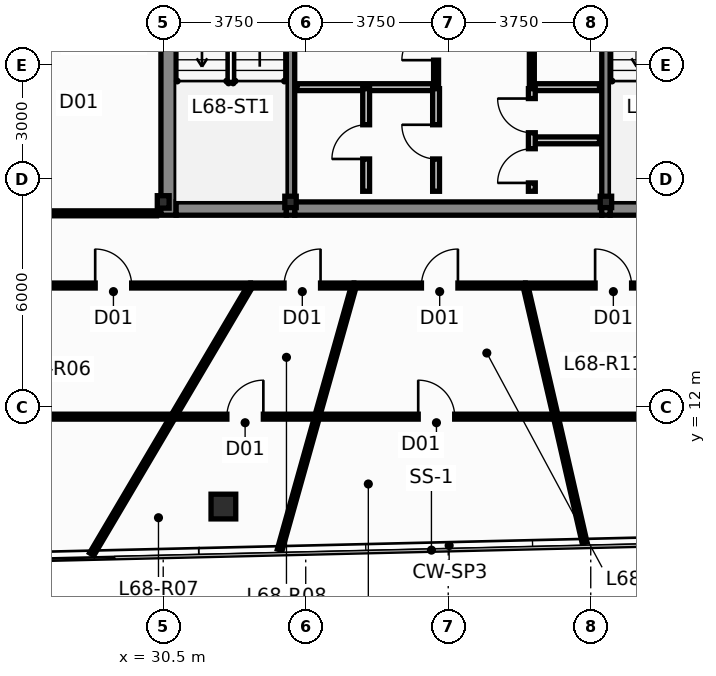
"""IFC4 building model, lengths in metres.
Left out: names, types, materials, properties, quantities, classifications, styles, units other than length and angle.
Written with IfcOpenShell. Run it as: python <this file> out.ifc"""

import sys

from ifc_helpers import new_model, si_unit, direction, frame, frame_2d, origin, origin_2d, place, context, subcontext, project, spatial, rectangle, hollow_rectangle, i_section, extrude, source, transform, mapped, element, fill, save


model = new_model("IFC4")
c1 = context("Model", 3, precision=1e-05, world=origin(), true_north=direction((0.0, 1.0)))
c2 = subcontext(c1, "Body", "Model", "MODEL_VIEW")
j1 = project(units=[si_unit("LENGTHUNIT", "METRE"), si_unit("PLANEANGLEUNIT", "RADIAN")], contexts=[c1])
p1 = place(None, origin())
s1 = spatial("IfcSite", under=j1, at=p1, CompositionType="ELEMENT")
p2 = place(p1, origin())
s2 = spatial("IfcBuilding", under=s1, at=p2, CompositionType="ELEMENT")
p3 = place(p2, frame((0.0, 0.0, 259.05)))
s3 = spatial("IfcBuildingStorey", under=s2, at=p3, CompositionType="ELEMENT", Elevation=259.05)
m1 = source(origin(), c2, "Body", "SweptSolid", [
    extrude(i_section(OverallWidth=0.311, OverallDepth=0.327, WebThickness=0.016, FlangeThickness=0.025, at=origin_2d()), origin(), (0.0, 0.0, 1.0), 3.65),
])
p4 = place(p3, frame((30.5, 17.4, 0.0), z_axis=(0.0, 0.0, 1.0), x_axis=(1.0, 0.0, 0.0)))
e1 = element("IfcColumn", 1, at=p4, inside=s3, PredefinedType="COLUMN", context=c2, shape_type="MappedRepresentation", body=[
    mapped(m1, transform((0.0, 0.0, 0.0), scale=1.0)),
])
m2 = source(origin(), c2, "Body", "SweptSolid", [
    extrude(hollow_rectangle(XDim=0.3, YDim=0.3, WallThickness=0.012, at=origin_2d()), origin(), (0.0, 0.0, 1.0), 3.65),
])
for number, where, z_axis, x_axis in (
    (2, (33.85, 17.4, 0.0), (0.0, 0.0, 1.0), (1.0, 0.0, 0.0)),
    (3, (42.15, 17.4, 0.0), (0.0, 0.0, 1.0), (1.0, 0.0, 0.0)),
):
    element("IfcColumn", number, at=place(p3, frame(where, z_axis=z_axis, x_axis=x_axis)), inside=s3, PredefinedType="COLUMN", context=c2, shape_type="MappedRepresentation", body=[
        mapped(m2, transform((0.0, 0.0, 0.0), scale=1.0)),
    ])
p5 = place(p3, frame((30.64, 17.05, 0.0), z_axis=(0.0, 0.0, 1.0), x_axis=(0.0, 1.0, 0.0)))
e4 = element("IfcWall", 4, at=p5, inside=s3, PredefinedType="SHEAR", context=c2, shape_type="SweptSolid", body=[
    extrude(rectangle(XDim=13.125, YDim=0.4, at=frame_2d((6.562, 0.0))), origin(), (0.0, 0.0, 1.0), 3.65),
])
p6 = place(p5, frame((6.3, 0.0, 0.0)))
e5 = element("IfcOpeningElement", 5, at=p6, cuts=e4, PredefinedType="OPENING", context=c2, shape_type="SweptSolid", body=[
    extrude(rectangle(XDim=1.12, YDim=2.15, at=frame_2d((0.56, 1.075))), frame((0.0, 0.212, 0.0), z_axis=(0.0, -1.0, 0.0), x_axis=(1.0, 0.0, 0.0)), (0.0, 0.0, 1.0), 0.424),
])
p7 = place(p5, frame((10.75, 0.0, 0.0)))
e6 = element("IfcOpeningElement", 6, at=p7, cuts=e4, PredefinedType="OPENING", context=c2, shape_type="SweptSolid", body=[
    extrude(rectangle(XDim=1.2, YDim=2.2, at=frame_2d((0.6, 1.1))), frame((0.0, 0.212, 0.0), z_axis=(0.0, -1.0, 0.0), x_axis=(1.0, 0.0, 0.0)), (0.0, 0.0, 1.0), 0.424),
])
p8 = place(p3, frame((30.84, 17.225, 0.0), z_axis=(0.0, 0.0, 1.0), x_axis=(1.0, 0.0, 0.0)))
e7 = element("IfcWall", 7, at=p8, inside=s3, PredefinedType="SHEAR", context=c2, shape_type="SweptSolid", body=[
    extrude(rectangle(XDim=2.9, YDim=0.35, at=frame_2d((1.45, 0.0))), origin(), (0.0, 0.0, 1.0), 3.65),
])
p9 = place(p3, frame((33.96, 17.225, 0.0), z_axis=(0.0, 0.0, 1.0), x_axis=(1.0, 0.0, 0.0)))
e8 = element("IfcWall", 8, at=p9, inside=s3, PredefinedType="SHEAR", context=c2, shape_type="SweptSolid", body=[
    extrude(rectangle(XDim=8.08, YDim=0.35, at=frame_2d((4.04, 0.0))), origin(), (0.0, 0.0, 1.0), 3.65),
])
p10 = place(p3, frame((42.26, 17.225, 0.0), z_axis=(0.0, 0.0, 1.0), x_axis=(1.0, 0.0, 0.0)))
e9 = element("IfcWall", 9, at=p10, inside=s3, PredefinedType="SHEAR", context=c2, shape_type="SweptSolid", body=[
    extrude(rectangle(XDim=2.9, YDim=0.35, at=frame_2d((1.45, 0.0))), origin(), (0.0, 0.0, 1.0), 3.65),
])
for number, where, z_axis, x_axis in (
    (10, (33.85, 17.05, 0.0), (0.0, 0.0, 1.0), (0.0, 1.0, 0.0)),
    (11, (42.15, 17.05, 0.0), (0.0, 0.0, 1.0), (0.0, 1.0, 0.0)),
):
    element("IfcWall", number, at=place(p3, frame(where, z_axis=z_axis, x_axis=x_axis)), inside=s3, PredefinedType="SHEAR", context=c2, shape_type="SweptSolid", body=[
        extrude(rectangle(XDim=13.125, YDim=0.22, at=frame_2d((6.562, 0.0))), origin(), (0.0, 0.0, 1.0), 3.65),
    ])
m3 = source(origin(), c2, "Body", "SweptSolid", [
    extrude(hollow_rectangle(XDim=0.65, YDim=0.65, WallThickness=0.04, at=origin_2d()), origin(), (0.0, 0.0, 1.0), 3.651),
])
p11 = place(p3, frame((32.083, 9.385, 0.0), z_axis=(-0.004480682206, 0.019795252729, 0.999794014513), x_axis=(-0.975326687046, -0.220766513622, 0.0)))
e12 = element("IfcColumn", 12, at=p11, inside=s3, PredefinedType="COLUMN", context=c2, shape_type="MappedRepresentation", body=[
    mapped(m3, transform((0.0, 0.0, 0.0), scale=1.0)),
])
p12 = place(p3, frame((34.02, 20.42, 0.0), z_axis=(0.0, 0.0, 1.0), x_axis=(1.0, 0.0, 0.0)))
e13 = element("IfcWall", 13, at=p12, inside=s3, PredefinedType="PARTITIONING", context=c2, shape_type="SweptSolid", body=[
    extrude(rectangle(XDim=3.64, YDim=0.18, at=frame_2d((1.82, 0.0))), origin(), (0.0, 0.0, 1.0), 3.4),
])
p13 = place(p3, frame((40.22, 20.42, 0.0), z_axis=(0.0, 0.0, 1.0), x_axis=(1.0, 0.0, 0.0)))
e14 = element("IfcWall", 14, at=p13, inside=s3, PredefinedType="PARTITIONING", context=c2, shape_type="SweptSolid", body=[
    extrude(rectangle(XDim=1.76, YDim=0.18, at=frame_2d((0.88, 0.0))), origin(), (0.0, 0.0, 1.0), 3.4),
])
p14 = place(p3, frame((37.68, 20.48, 0.0), z_axis=(0.0, 0.0, 1.0), x_axis=(0.0, 1.0, 0.0)))
e15 = element("IfcWall", 15, at=p14, inside=s3, PredefinedType="PARTITIONING", context=c2, shape_type="SweptSolid", body=[
    extrude(rectangle(XDim=6.9, YDim=0.13, at=frame_2d((3.45, 0.0))), origin(), (0.0, 0.0, 1.0), 3.4),
])
p15 = place(p14, frame((0.65, 0.0, 0.0)))
e16 = element("IfcOpeningElement", 16, at=p15, cuts=e15, PredefinedType="OPENING", context=c2, shape_type="SweptSolid", body=[
    extrude(rectangle(XDim=0.9, YDim=2.1, at=frame_2d((0.45, 1.05))), frame((0.0, 0.077, 0.0), z_axis=(0.0, -1.0, 0.0), x_axis=(1.0, 0.0, 0.0)), (0.0, 0.0, 1.0), 0.154),
])
p16 = place(p14, frame((2.95, 0.0, 0.0)))
e17 = element("IfcOpeningElement", 17, at=p16, cuts=e15, PredefinedType="OPENING", context=c2, shape_type="SweptSolid", body=[
    extrude(rectangle(XDim=0.9, YDim=2.1, at=frame_2d((0.45, 1.05))), frame((0.0, 0.077, 0.0), z_axis=(0.0, -1.0, 0.0), x_axis=(1.0, 0.0, 0.0)), (0.0, 0.0, 1.0), 0.154),
])
p17 = place(p14, frame((5.25, 0.0, 0.0)))
e18 = element("IfcOpeningElement", 18, at=p17, cuts=e15, PredefinedType="OPENING", context=c2, shape_type="SweptSolid", body=[
    extrude(rectangle(XDim=0.9, YDim=2.1, at=frame_2d((0.45, 1.05))), frame((0.0, 0.077, 0.0), z_axis=(0.0, -1.0, 0.0), x_axis=(1.0, 0.0, 0.0)), (0.0, 0.0, 1.0), 0.154),
])
p18 = place(p3, frame((40.2, 20.48, 0.0), z_axis=(0.0, 0.0, 1.0), x_axis=(0.0, 1.0, 0.0)))
e19 = element("IfcWall", 19, at=p18, inside=s3, PredefinedType="PARTITIONING", context=c2, shape_type="SweptSolid", body=[
    extrude(rectangle(XDim=6.9, YDim=0.13, at=frame_2d((3.45, 0.0))), origin(), (0.0, 0.0, 1.0), 3.4),
])
p19 = place(p18, frame((2.6, 0.0, 0.0)))
e20 = element("IfcOpeningElement", 20, at=p19, cuts=e19, PredefinedType="OPENING", context=c2, shape_type="SweptSolid", body=[
    extrude(rectangle(XDim=0.9, YDim=2.1, at=frame_2d((0.45, 1.05))), frame((0.0, 0.077, 0.0), z_axis=(0.0, -1.0, 0.0), x_axis=(1.0, 0.0, 0.0)), (0.0, 0.0, 1.0), 0.154),
])
p20 = place(p3, frame((35.84, 17.68, 0.0), z_axis=(0.0, 0.0, 1.0), x_axis=(0.0, 1.0, 0.0)))
e21 = element("IfcWall", 21, at=p20, inside=s3, PredefinedType="PARTITIONING", context=c2, shape_type="SweptSolid", body=[
    extrude(rectangle(XDim=2.7, YDim=0.18, at=frame_2d((1.35, 0.0))), origin(), (0.0, 0.0, 1.0), 3.4),
])
p21 = place(p20, frame((0.85, 0.0, 0.0)))
e22 = element("IfcOpeningElement", 22, at=p21, cuts=e21, PredefinedType="OPENING", context=c2, shape_type="SweptSolid", body=[
    extrude(rectangle(XDim=0.9, YDim=2.1, at=frame_2d((0.45, 1.05))), frame((0.0, 0.102, 0.0), z_axis=(0.0, -1.0, 0.0), x_axis=(1.0, 0.0, 0.0)), (0.0, 0.0, 1.0), 0.204),
])
p22 = place(p3, frame((37.68, 17.68, 0.0), z_axis=(0.0, 0.0, 1.0), x_axis=(0.0, 1.0, 0.0)))
e23 = element("IfcWall", 23, at=p22, inside=s3, PredefinedType="PARTITIONING", context=c2, shape_type="SweptSolid", body=[
    extrude(rectangle(XDim=2.7, YDim=0.18, at=frame_2d((1.35, 0.0))), origin(), (0.0, 0.0, 1.0), 3.4),
])
p23 = place(p22, frame((0.85, 0.0, 0.0)))
e24 = element("IfcOpeningElement", 24, at=p23, cuts=e23, PredefinedType="OPENING", context=c2, shape_type="SweptSolid", body=[
    extrude(rectangle(XDim=0.9, YDim=2.1, at=frame_2d((0.45, 1.05))), frame((0.0, 0.102, 0.0), z_axis=(0.0, -1.0, 0.0), x_axis=(1.0, 0.0, 0.0)), (0.0, 0.0, 1.0), 0.204),
])
p24 = place(p3, frame((40.28, 19.02, 0.0), z_axis=(0.0, 0.0, 1.0), x_axis=(1.0, 0.0, 0.0)))
e25 = element("IfcWall", 25, at=p24, inside=s3, PredefinedType="PARTITIONING", context=c2, shape_type="SweptSolid", body=[
    extrude(rectangle(XDim=1.7, YDim=0.18, at=frame_2d((0.85, 0.0))), origin(), (0.0, 0.0, 1.0), 3.4),
])
p25 = place(p3, frame((40.2, 17.68, 0.0), z_axis=(0.0, 0.0, 1.0), x_axis=(0.0, 1.0, 0.0)))
e26 = element("IfcWall", 26, at=p25, inside=s3, PredefinedType="PARTITIONING", context=c2, shape_type="SweptSolid", body=[
    extrude(rectangle(XDim=2.7, YDim=0.18, at=frame_2d((1.35, 0.0))), origin(), (0.0, 0.0, 1.0), 3.4),
])
p26 = place(p25, frame((0.22, 0.0, 0.0)))
e27 = element("IfcOpeningElement", 27, at=p26, cuts=e26, PredefinedType="OPENING", context=c2, shape_type="SweptSolid", body=[
    extrude(rectangle(XDim=0.9, YDim=2.1, at=frame_2d((0.45, 1.05))), frame((0.0, 0.102, 0.0), z_axis=(0.0, -1.0, 0.0), x_axis=(1.0, 0.0, 0.0)), (0.0, 0.0, 1.0), 0.204),
])
p27 = place(p25, frame((1.54, 0.0, 0.0)))
e28 = element("IfcOpeningElement", 28, at=p27, cuts=e26, PredefinedType="OPENING", context=c2, shape_type="SweptSolid", body=[
    extrude(rectangle(XDim=0.9, YDim=2.1, at=frame_2d((0.45, 1.05))), frame((0.0, 0.102, 0.0), z_axis=(0.0, -1.0, 0.0), x_axis=(1.0, 0.0, 0.0)), (0.0, 0.0, 1.0), 0.204),
])
p28 = place(p3, frame((20.705, 11.75, 0.0), z_axis=(0.0, 0.0, 1.0), x_axis=(1.0, 0.0, 0.0)))
e29 = element("IfcWall", 29, at=p28, inside=s3, PredefinedType="PARTITIONING", context=c2, shape_type="SweptSolid", body=[
    extrude(rectangle(XDim=10.05, YDim=0.13, at=frame_2d((5.025, 0.0))), origin(), (0.0, 0.0, 1.0), 3.129),
])
p29 = place(p28, frame((4.545, 0.0, 0.0)))
e30 = element("IfcOpeningElement", 30, at=p29, cuts=e29, PredefinedType="OPENING", context=c2, shape_type="SweptSolid", body=[
    extrude(rectangle(XDim=0.96, YDim=2.15, at=frame_2d((0.48, 1.075))), frame((0.0, 0.077, 0.0), z_axis=(0.0, -1.0, 0.0), x_axis=(1.0, 0.0, 0.0)), (0.0, 0.0, 1.0), 0.154),
])
p30 = place(p3, frame((25.585, 15.2, 0.0), z_axis=(0.0, 0.0, 1.0), x_axis=(1.0, 0.0, 0.0)))
e31 = element("IfcWall", 31, at=p30, inside=s3, PredefinedType="PARTITIONING", context=c2, shape_type="SweptSolid", body=[
    extrude(rectangle(XDim=7.21, YDim=0.13, at=frame_2d((3.605, 0.0))), origin(), (0.0, 0.0, 1.0), 3.129),
])
p31 = place(p30, frame((3.125, 0.0, 0.0)))
e32 = element("IfcOpeningElement", 32, at=p31, cuts=e31, PredefinedType="OPENING", context=c2, shape_type="SweptSolid", body=[
    extrude(rectangle(XDim=0.96, YDim=2.15, at=frame_2d((0.48, 1.075))), frame((0.0, 0.077, 0.0), z_axis=(0.0, -1.0, 0.0), x_axis=(1.0, 0.0, 0.0)), (0.0, 0.0, 1.0), 0.154),
])
p32 = place(p3, frame((40.835, 11.75, 0.0), z_axis=(0.0, 0.0, 1.0), x_axis=(1.0, 0.0, 0.0)))
e33 = element("IfcWall", 33, at=p32, inside=s3, PredefinedType="PARTITIONING", context=c2, shape_type="SweptSolid", body=[
    extrude(rectangle(XDim=6.43, YDim=0.13, at=frame_2d((3.215, 0.0))), origin(), (0.0, 0.0, 1.0), 3.129),
])
p33 = place(p32, frame((2.735, 0.0, 0.0)))
e34 = element("IfcOpeningElement", 34, at=p33, cuts=e33, PredefinedType="OPENING", context=c2, shape_type="SweptSolid", body=[
    extrude(rectangle(XDim=0.96, YDim=2.15, at=frame_2d((0.48, 1.075))), frame((0.0, 0.077, 0.0), z_axis=(0.0, -1.0, 0.0), x_axis=(1.0, 0.0, 0.0)), (0.0, 0.0, 1.0), 0.154),
])
p34 = place(p3, frame((34.555, 11.75, 0.0), z_axis=(0.0, 0.0, 1.0), x_axis=(1.0, 0.0, 0.0)))
e35 = element("IfcWall", 35, at=p34, inside=s3, PredefinedType="PARTITIONING", context=c2, shape_type="SweptSolid", body=[
    extrude(rectangle(XDim=6.27, YDim=0.13, at=frame_2d((3.135, 0.0))), origin(), (0.0, 0.0, 1.0), 3.129),
])
p35 = place(p34, frame((2.655, 0.0, 0.0)))
e36 = element("IfcOpeningElement", 36, at=p35, cuts=e35, PredefinedType="OPENING", context=c2, shape_type="SweptSolid", body=[
    extrude(rectangle(XDim=0.96, YDim=2.15, at=frame_2d((0.48, 1.075))), frame((0.0, 0.077, 0.0), z_axis=(0.0, -1.0, 0.0), x_axis=(1.0, 0.0, 0.0)), (0.0, 0.0, 1.0), 0.154),
])
p36 = place(p3, frame((40.035, 15.2, 0.0), z_axis=(0.0, 0.0, 1.0), x_axis=(1.0, 0.0, 0.0)))
e37 = element("IfcWall", 37, at=p36, inside=s3, PredefinedType="PARTITIONING", context=c2, shape_type="SweptSolid", body=[
    extrude(rectangle(XDim=4.62, YDim=0.13, at=frame_2d((2.31, 0.0))), origin(), (0.0, 0.0, 1.0), 3.129),
])
p37 = place(p36, frame((1.83, 0.0, 0.0)))
e38 = element("IfcOpeningElement", 38, at=p37, cuts=e37, PredefinedType="OPENING", context=c2, shape_type="SweptSolid", body=[
    extrude(rectangle(XDim=0.96, YDim=2.15, at=frame_2d((0.48, 1.075))), frame((0.0, 0.077, 0.0), z_axis=(0.0, -1.0, 0.0), x_axis=(1.0, 0.0, 0.0)), (0.0, 0.0, 1.0), 0.154),
])
p38 = place(p3, frame((35.525, 15.2, 0.0), z_axis=(0.0, 0.0, 1.0), x_axis=(1.0, 0.0, 0.0)))
e39 = element("IfcWall", 39, at=p38, inside=s3, PredefinedType="PARTITIONING", context=c2, shape_type="SweptSolid", body=[
    extrude(rectangle(XDim=4.5, YDim=0.13, at=frame_2d((2.25, 0.0))), origin(), (0.0, 0.0, 1.0), 3.129),
])
p39 = place(p38, frame((1.77, 0.0, 0.0)))
e40 = element("IfcOpeningElement", 40, at=p39, cuts=e39, PredefinedType="OPENING", context=c2, shape_type="SweptSolid", body=[
    extrude(rectangle(XDim=0.96, YDim=2.15, at=frame_2d((0.48, 1.075))), frame((0.0, 0.077, 0.0), z_axis=(0.0, -1.0, 0.0), x_axis=(1.0, 0.0, 0.0)), (0.0, 0.0, 1.0), 0.154),
])
p40 = place(p3, frame((28.619, 8.13, 0.0), z_axis=(0.0, 0.0, 1.0), x_axis=(0.508929036643, 0.860808477922, 0.0)))
e41 = element("IfcWall", 41, at=p40, inside=s3, PredefinedType="PARTITIONING", context=c2, shape_type="SweptSolid", body=[
    extrude(rectangle(XDim=4.2, YDim=0.13, at=frame_2d((2.1, 0.0))), origin(), (0.0, 0.0, 1.0), 3.4),
])
p41 = place(p3, frame((30.763, 11.754, 0.0), z_axis=(0.0, 0.0, 1.0), x_axis=(0.508764284134, 0.860905861979, 0.0)))
e42 = element("IfcWall", 42, at=p41, inside=s3, PredefinedType="PARTITIONING", context=c2, shape_type="SweptSolid", body=[
    extrude(rectangle(XDim=3.998, YDim=0.13, at=frame_2d((1.999, 0.0))), origin(), (0.0, 0.0, 1.0), 3.4),
])
p42 = place(p3, frame((30.765, 11.75, 0.0), z_axis=(0.0, 0.0, 1.0), x_axis=(1.0, 0.0, 0.0)))
e43 = element("IfcWall", 43, at=p42, inside=s3, PredefinedType="PARTITIONING", context=c2, shape_type="SweptSolid", body=[
    extrude(rectangle(XDim=3.78, YDim=0.13, at=frame_2d((1.89, 0.0))), origin(), (0.0, 0.0, 1.0), 3.129),
])
p43 = place(p42, frame((1.41, 0.0, 0.0)))
e44 = element("IfcOpeningElement", 44, at=p43, cuts=e43, PredefinedType="OPENING", context=c2, shape_type="SweptSolid", body=[
    extrude(rectangle(XDim=0.96, YDim=2.15, at=frame_2d((0.48, 1.075))), frame((0.0, 0.077, 0.0), z_axis=(0.0, -1.0, 0.0), x_axis=(1.0, 0.0, 0.0)), (0.0, 0.0, 1.0), 0.154),
])
p44 = place(p3, frame((33.567, 8.248, 0.0), z_axis=(0.0, 0.0, 1.0), x_axis=(0.270253111102, 0.962789310254, 0.0)))
e45 = element("IfcWall", 45, at=p44, inside=s3, PredefinedType="PARTITIONING", context=c2, shape_type="SweptSolid", body=[
    extrude(rectangle(XDim=3.633, YDim=0.13, at=frame_2d((1.816, 0.0))), origin(), (0.0, 0.0, 1.0), 3.4),
])
p45 = place(p3, frame((34.551, 11.755, 0.0), z_axis=(0.0, 0.0, 1.0), x_axis=(0.270866253108, 0.962616991813, 0.0)))
e46 = element("IfcWall", 46, at=p45, inside=s3, PredefinedType="PARTITIONING", context=c2, shape_type="SweptSolid", body=[
    extrude(rectangle(XDim=3.574, YDim=0.13, at=frame_2d((1.787, 0.0))), origin(), (0.0, 0.0, 1.0), 3.4),
])
p46 = place(p3, frame((40.031, 15.195, 0.0), z_axis=(0.0, 0.0, 1.0), x_axis=(0.225990312699, -0.97412954917, 0.0)))
e47 = element("IfcWall", 47, at=p46, inside=s3, PredefinedType="PARTITIONING", context=c2, shape_type="SweptSolid", body=[
    extrude(rectangle(XDim=3.531, YDim=0.13, at=frame_2d((1.766, 0.0))), origin(), (0.0, 0.0, 1.0), 3.4),
])
p47 = place(p3, frame((40.831, 11.745, 0.0), z_axis=(0.0, 0.0, 1.0), x_axis=(0.222961591658, -0.974827230152, 0.0)))
e48 = element("IfcWall", 48, at=p47, inside=s3, PredefinedType="PARTITIONING", context=c2, shape_type="SweptSolid", body=[
    extrude(rectangle(XDim=3.392, YDim=0.13, at=frame_2d((1.696, 0.0))), origin(), (0.0, 0.0, 1.0), 3.4),
])
p48 = place(p3, frame((30.325, 17.1, 0.0), z_axis=(0.0, 0.0, 1.0), x_axis=(-1.0, 0.0, 0.0)))
e49 = element("IfcWall", 49, at=p48, inside=s3, PredefinedType="PARTITIONING", context=c2, shape_type="SweptSolid", body=[
    extrude(rectangle(XDim=2.92, YDim=0.13, at=frame_2d((1.46, 0.0))), origin(), (0.0, 0.0, 1.0), 2.985),
])
p49 = place(p3, frame((32.805, 15.2, 0.0), z_axis=(0.0, 0.0, 1.0), x_axis=(1.0, 0.0, 0.0)))
e50 = element("IfcWall", 50, at=p49, inside=s3, PredefinedType="PARTITIONING", context=c2, shape_type="SweptSolid", body=[
    extrude(rectangle(XDim=2.71, YDim=0.13, at=frame_2d((1.355, 0.0))), origin(), (0.0, 0.0, 1.0), 3.129),
])
p50 = place(p49, frame((0.875, 0.0, 0.0)))
e51 = element("IfcOpeningElement", 51, at=p50, cuts=e50, PredefinedType="OPENING", context=c2, shape_type="SweptSolid", body=[
    extrude(rectangle(XDim=0.96, YDim=2.15, at=frame_2d((0.48, 1.075))), frame((0.0, 0.077, 0.0), z_axis=(0.0, -1.0, 0.0), x_axis=(1.0, 0.0, 0.0)), (0.0, 0.0, 1.0), 0.154),
])
p51 = place(p15, origin())
e52 = element("IfcDoor", 52, at=p51, inside=s3, OperationType="SINGLE_SWING_LEFT", PredefinedType="DOOR", context=c2, shape_type="SweptSolid", body=[
    extrude(rectangle(XDim=0.9, YDim=2.1, at=frame_2d((0.45, 1.05))), frame((0.0, 0.025, 0.0), z_axis=(0.0, -1.0, 0.0), x_axis=(1.0, 0.0, 0.0)), (0.0, 0.0, 1.0), 0.05),
])
fill(e16, e52)
p52 = place(p21, origin())
e53 = element("IfcDoor", 53, at=p52, inside=s3, OperationType="SINGLE_SWING_LEFT", PredefinedType="DOOR", context=c2, shape_type="SweptSolid", body=[
    extrude(rectangle(XDim=0.9, YDim=2.1, at=frame_2d((0.45, 1.05))), frame((0.0, 0.025, 0.0), z_axis=(0.0, -1.0, 0.0), x_axis=(1.0, 0.0, 0.0)), (0.0, 0.0, 1.0), 0.05),
])
fill(e22, e53)
p53 = place(p23, origin())
e54 = element("IfcDoor", 54, at=p53, inside=s3, OperationType="SINGLE_SWING_RIGHT", PredefinedType="DOOR", context=c2, shape_type="SweptSolid", body=[
    extrude(rectangle(XDim=0.9, YDim=2.1, at=frame_2d((0.45, 1.05))), frame((0.0, 0.025, 0.0), z_axis=(0.0, -1.0, 0.0), x_axis=(1.0, 0.0, 0.0)), (0.0, 0.0, 1.0), 0.05),
])
fill(e24, e54)
p54 = place(p26, origin())
e55 = element("IfcDoor", 55, at=p54, inside=s3, OperationType="SINGLE_SWING_LEFT", PredefinedType="DOOR", context=c2, shape_type="SweptSolid", body=[
    extrude(rectangle(XDim=0.9, YDim=2.1, at=frame_2d((0.45, 1.05))), frame((0.0, 0.025, 0.0), z_axis=(0.0, -1.0, 0.0), x_axis=(1.0, 0.0, 0.0)), (0.0, 0.0, 1.0), 0.05),
])
fill(e27, e55)
p55 = place(p27, origin())
e56 = element("IfcDoor", 56, at=p55, inside=s3, OperationType="SINGLE_SWING_RIGHT", PredefinedType="DOOR", context=c2, shape_type="SweptSolid", body=[
    extrude(rectangle(XDim=0.9, YDim=2.1, at=frame_2d((0.45, 1.05))), frame((0.0, 0.025, 0.0), z_axis=(0.0, -1.0, 0.0), x_axis=(1.0, 0.0, 0.0)), (0.0, 0.0, 1.0), 0.05),
])
fill(e28, e56)
p56 = place(p31, origin())
e57 = element("IfcDoor", 57, at=p56, inside=s3, OperationType="SINGLE_SWING_LEFT", PredefinedType="DOOR", context=c2, shape_type="SweptSolid", body=[
    extrude(rectangle(XDim=0.96, YDim=2.15, at=frame_2d((0.48, 1.075))), frame((0.0, 0.025, 0.0), z_axis=(0.0, -1.0, 0.0), x_axis=(1.0, 0.0, 0.0)), (0.0, 0.0, 1.0), 0.05),
])
fill(e32, e57)
p57 = place(p35, origin())
e58 = element("IfcDoor", 58, at=p57, inside=s3, OperationType="SINGLE_SWING_LEFT", PredefinedType="DOOR", context=c2, shape_type="SweptSolid", body=[
    extrude(rectangle(XDim=0.96, YDim=2.15, at=frame_2d((0.48, 1.075))), frame((0.0, 0.025, 0.0), z_axis=(0.0, -1.0, 0.0), x_axis=(1.0, 0.0, 0.0)), (0.0, 0.0, 1.0), 0.05),
])
fill(e36, e58)
p58 = place(p37, origin())
e59 = element("IfcDoor", 59, at=p58, inside=s3, OperationType="SINGLE_SWING_LEFT", PredefinedType="DOOR", context=c2, shape_type="SweptSolid", body=[
    extrude(rectangle(XDim=0.96, YDim=2.15, at=frame_2d((0.48, 1.075))), frame((0.0, 0.025, 0.0), z_axis=(0.0, -1.0, 0.0), x_axis=(1.0, 0.0, 0.0)), (0.0, 0.0, 1.0), 0.05),
])
fill(e38, e59)
p59 = place(p39, origin())
e60 = element("IfcDoor", 60, at=p59, inside=s3, OperationType="SINGLE_SWING_RIGHT", PredefinedType="DOOR", context=c2, shape_type="SweptSolid", body=[
    extrude(rectangle(XDim=0.96, YDim=2.15, at=frame_2d((0.48, 1.075))), frame((0.0, 0.025, 0.0), z_axis=(0.0, -1.0, 0.0), x_axis=(1.0, 0.0, 0.0)), (0.0, 0.0, 1.0), 0.05),
])
fill(e40, e60)
p60 = place(p43, origin())
e61 = element("IfcDoor", 61, at=p60, inside=s3, OperationType="SINGLE_SWING_RIGHT", PredefinedType="DOOR", context=c2, shape_type="SweptSolid", body=[
    extrude(rectangle(XDim=0.96, YDim=2.15, at=frame_2d((0.48, 1.075))), frame((0.0, 0.025, 0.0), z_axis=(0.0, -1.0, 0.0), x_axis=(1.0, 0.0, 0.0)), (0.0, 0.0, 1.0), 0.05),
])
fill(e44, e61)
p61 = place(p50, origin())
e62 = element("IfcDoor", 62, at=p61, inside=s3, OperationType="SINGLE_SWING_RIGHT", PredefinedType="DOOR", context=c2, shape_type="SweptSolid", body=[
    extrude(rectangle(XDim=0.96, YDim=2.15, at=frame_2d((0.48, 1.075))), frame((0.0, 0.025, 0.0), z_axis=(0.0, -1.0, 0.0), x_axis=(1.0, 0.0, 0.0)), (0.0, 0.0, 1.0), 0.05),
])
fill(e51, e62)
save(model, sys.argv[1])
